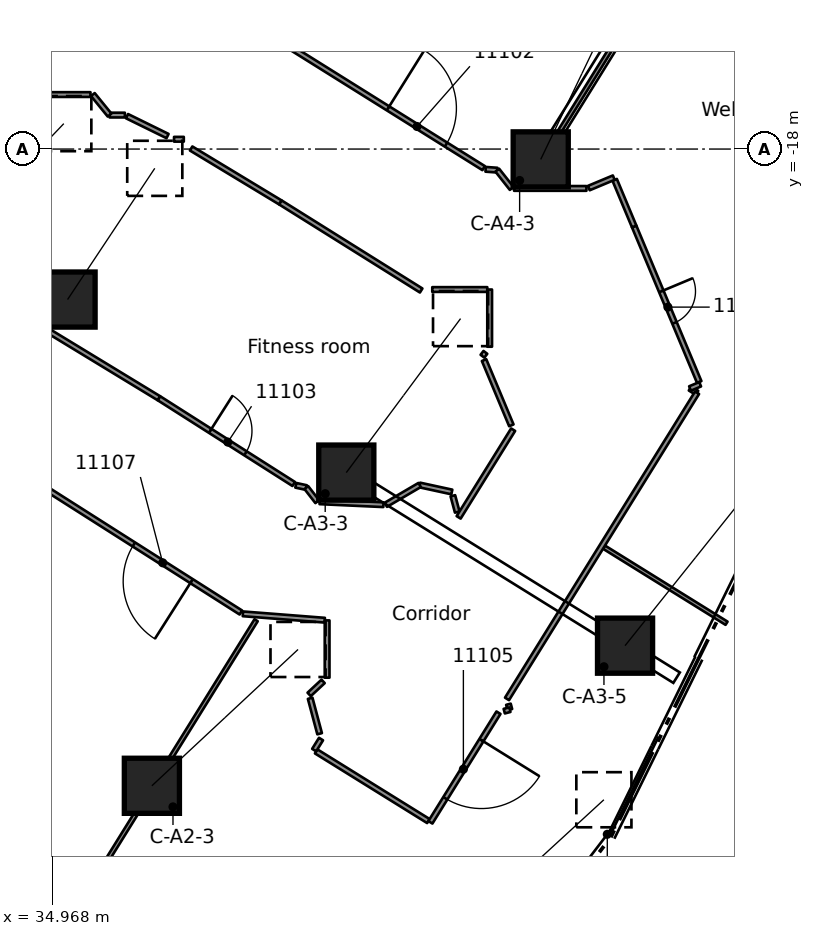
"""IFC4 building model, lengths in metres.
Left out: names, types, materials, properties, quantities, classifications, styles, units other than length and angle.
Written with IfcOpenShell. Run it as: python <this file> out.ifc"""

import sys

from ifc_helpers import new_model, si_unit, direction, frame, frame_2d, origin, origin_2d, place, context, subcontext, project, spatial, rectangle, extrude, element, fill, save


model = new_model("IFC4")
c1 = context("Model", 3, precision=1e-05, world=origin(), true_north=direction((0.0, 1.0)))
c2 = subcontext(c1, "Body", "Model", "MODEL_VIEW")
j1 = project(units=[si_unit("LENGTHUNIT", "METRE"), si_unit("PLANEANGLEUNIT", "RADIAN")], contexts=[c1])
p1 = place(None, origin())
s1 = spatial("IfcSite", under=j1, at=p1, CompositionType="ELEMENT")
p2 = place(p1, origin())
s2 = spatial("IfcBuilding", under=s1, at=p2, CompositionType="ELEMENT")
p3 = place(p2, frame((0.0, 0.0, 54.8)))
s3 = spatial("IfcBuildingStorey", under=s2, at=p3, CompositionType="ELEMENT", Elevation=54.8)
p4 = place(p3, frame((37.59, -34.754, 0.644), z_axis=(0.650011603321, 0.606231859074, 0.45822248809), x_axis=(-0.682050250906, 0.731305309183, 0.0)))
e1 = element("IfcColumn", 1, at=p4, inside=s3, PredefinedType="COLUMN", context=c2, shape_type="SweptSolid", body=[
    extrude(rectangle(XDim=1.45, YDim=1.45, at=origin_2d()), origin(), (0.0, 0.0, 1.0), 5.917),
])
p5 = place(p3, frame((44.924, -39.308, 0.666), z_axis=(0.676410943669, 0.621108726451, 0.395843637324), x_axis=(-0.676354787689, 0.736575998231, 0.0)))
e2 = element("IfcColumn", 2, at=p5, inside=s3, PredefinedType="COLUMN", context=c2, shape_type="SweptSolid", body=[
    extrude(rectangle(XDim=1.45, YDim=1.45, at=origin_2d()), origin(), (0.0, 0.0, 1.0), 6.741),
])
p6 = place(p3, frame((35.371, -21.96, 0.601), z_axis=(0.458815633404, 0.690322287577, 0.559413401536), x_axis=(-0.832828584318, 0.553530983002, 0.0)))
e3 = element("IfcColumn", 3, at=p6, inside=s3, PredefinedType="COLUMN", context=c2, shape_type="SweptSolid", body=[
    extrude(rectangle(XDim=1.45, YDim=1.45, at=origin_2d()), origin(), (0.0, 0.0, 1.0), 5.002),
])
p7 = place(p3, frame((42.706, -26.513, 0.638), z_axis=(0.52437230605, 0.706642348451, 0.475068706635), x_axis=(-0.803049477983, 0.595912355898, 0.0)))
e4 = element("IfcColumn", 4, at=p7, inside=s3, PredefinedType="COLUMN", context=c2, shape_type="SweptSolid", body=[
    extrude(rectangle(XDim=1.45, YDim=1.45, at=origin_2d()), origin(), (0.0, 0.0, 1.0), 5.734),
])
p8 = place(p3, frame((50.041, -31.067, 0.661), z_axis=(0.569633877133, 0.712332079471, 0.410000310463), x_axis=(-0.780992758951, 0.624540079151, 0.0)))
e5 = element("IfcColumn", 5, at=p8, inside=s3, PredefinedType="COLUMN", context=c2, shape_type="SweptSolid", body=[
    extrude(rectangle(XDim=1.45, YDim=1.45, at=origin_2d()), origin(), (0.0, 0.0, 1.0), 6.531),
])
p9 = place(p3, frame((32.539, -20.201, 0.591), z_axis=(0.561988017013, 0.590152683579, 0.579559555869), x_axis=(-0.724176021498, 0.689615175215, 0.0)))
e6 = element("IfcColumn", 6, at=p9, inside=s3, PredefinedType="COLUMN", context=c2, shape_type="SweptSolid", body=[
    extrude(rectangle(XDim=1.45, YDim=1.45, at=origin_2d()), origin(), (0.0, 0.0, 1.0), 4.863),
])
p10 = place(p3, frame((47.822, -18.272, 0.637), z_axis=(0.380217041429, 0.791847782589, 0.47792477506), x_axis=(-0.901465266599, 0.432851444626, 0.0)))
e7 = element("IfcColumn", 7, at=p10, inside=s3, PredefinedType="COLUMN", context=c2, shape_type="SweptSolid", body=[
    extrude(rectangle(XDim=1.45, YDim=1.45, at=origin_2d()), origin(), (0.0, 0.0, 1.0), 5.705),
])
p11 = place(p3, frame((41.755, -32.451, 0.0), z_axis=(0.0, 0.0, 1.0), x_axis=(0.257851455591, -0.966184571834, 0.0)))
e8 = element("IfcWall", 8, at=p11, inside=s3, PredefinedType="PARTITIONING", context=c2, shape_type="SweptSolid", body=[
    extrude(rectangle(XDim=0.966, YDim=0.125, at=frame_2d((0.483, 0.0))), origin(), (0.0, 0.0, 1.0), 3.58),
])
p12 = place(p3, frame((45.51, -27.123, 0.0), z_axis=(0.0, 0.0, 1.0), x_axis=(0.259479518398, -0.96574861094, 0.0)))
e9 = element("IfcWall", 9, at=p12, inside=s3, PredefinedType="PARTITIONING", context=c2, shape_type="SweptSolid", body=[
    extrude(rectangle(XDim=0.443, YDim=0.125, at=frame_2d((0.222, 0.0))), origin(), (0.0, 0.0, 1.0), 3.58),
])
p13 = place(p3, frame((46.972, -32.608, 0.0), z_axis=(0.0, 0.0, 1.0), x_axis=(0.258901994846, -0.965903596155, 0.0)))
e10 = element("IfcWall", 10, at=p13, inside=s3, PredefinedType="PARTITIONING", context=c2, shape_type="SweptSolid", body=[
    extrude(rectangle(XDim=0.147, YDim=0.125, at=frame_2d((0.074, 0.0))), origin(), (0.0, 0.0, 1.0), 3.58),
])
p14 = place(p3, frame((46.331, -23.553, 0.0), z_axis=(0.0, 0.0, 1.0), x_axis=(0.385798010162, -0.922583272857, 0.0)))
e11 = element("IfcWall", 11, at=p14, inside=s3, PredefinedType="PARTITIONING", context=c2, shape_type="SweptSolid", body=[
    extrude(rectangle(XDim=1.861, YDim=0.125, at=frame_2d((0.931, 0.0))), origin(), (0.0, 0.0, 1.0), 3.58),
])
p15 = place(p3, frame((50.281, -20.037, 0.0), z_axis=(0.0, 0.0, 1.0), x_axis=(0.385881073625, -0.922548533692, 0.0)))
e12 = element("IfcWall", 12, at=p15, inside=s3, PredefinedType="PARTITIONING", context=c2, shape_type="SweptSolid", body=[
    extrude(rectangle(XDim=4.436, YDim=0.125, at=frame_2d((2.218, 0.0))), origin(), (0.0, 0.0, 1.0), 3.58),
])
p16 = place(p15, frame((1.85, 0.0, 0.0)))
e13 = element("IfcOpeningElement", 13, at=p16, cuts=e12, PredefinedType="OPENING", context=c2, shape_type="SweptSolid", body=[
    extrude(rectangle(XDim=0.9, YDim=2.1, at=frame_2d((0.45, 1.05))), frame((0.0, 0.073, 0.0), z_axis=(0.0, -1.0, 0.0), x_axis=(1.0, 0.0, 0.0)), (0.0, 0.0, 1.0), 0.145),
])
p17 = place(p3, frame((49.768, -18.81, 0.0), z_axis=(0.0, 0.0, 1.0), x_axis=(0.385683969808, -0.922630953, 0.0)))
e14 = element("IfcWall", 14, at=p17, inside=s3, PredefinedType="PARTITIONING", context=c2, shape_type="SweptSolid", body=[
    extrude(rectangle(XDim=1.33, YDim=0.125, at=frame_2d((0.665, 0.0))), origin(), (0.0, 0.0, 1.0), 3.58),
])
p18 = place(p3, frame((39.932, -30.195, 0.0), z_axis=(0.0, 0.0, 1.0), x_axis=(-0.843820070804, 0.536626208927, 0.0)))
e15 = element("IfcWall", 15, at=p18, inside=s3, PredefinedType="PARTITIONING", context=c2, shape_type="SweptSolid", body=[
    extrude(rectangle(XDim=6.464, YDim=0.125, at=frame_2d((3.232, 0.0))), origin(), (0.0, 0.0, 1.0), 3.58),
])
p19 = place(p18, frame((1.538, 0.0, 0.0)))
e16 = element("IfcOpeningElement", 16, at=p19, cuts=e15, PredefinedType="OPENING", context=c2, shape_type="SweptSolid", body=[
    extrude(rectangle(XDim=1.8, YDim=2.1, at=frame_2d((0.9, 1.05))), frame((0.0, 0.073, 0.0), z_axis=(0.0, -1.0, 0.0), x_axis=(1.0, 0.0, 0.0)), (0.0, 0.0, 1.0), 0.145),
])
p20 = place(p3, frame((37.774, -24.556, 0.0), z_axis=(0.0, 0.0, 1.0), x_axis=(0.843747538383, -0.53674024581, 0.0)))
e17 = element("IfcWall", 17, at=p20, inside=s3, PredefinedType="PARTITIONING", context=c2, shape_type="SweptSolid", body=[
    extrude(rectangle(XDim=4.205, YDim=0.125, at=frame_2d((2.103, 0.0))), origin(), (0.0, 0.0, 1.0), 3.58),
])
p21 = place(p20, frame((1.6, 0.0, 0.0)))
e18 = element("IfcOpeningElement", 18, at=p21, cuts=e17, PredefinedType="OPENING", context=c2, shape_type="SweptSolid", body=[
    extrude(rectangle(XDim=1.1, YDim=2.1, at=frame_2d((0.55, 1.05))), frame((0.0, 0.073, 0.0), z_axis=(0.0, -1.0, 0.0), x_axis=(1.0, 0.0, 0.0)), (0.0, 0.0, 1.0), 0.145),
])
p22 = place(p3, frame((37.774, -24.556, 0.0), z_axis=(0.0, 0.0, 1.0), x_axis=(-0.854394223193, 0.519625356747, 0.0)))
e19 = element("IfcWall", 19, at=p22, inside=s3, PredefinedType="PARTITIONING", context=c2, shape_type="SweptSolid", body=[
    extrude(rectangle(XDim=3.444, YDim=0.125, at=frame_2d((1.722, 0.0))), origin(), (0.0, 0.0, 1.0), 3.58),
])
p23 = place(p3, frame((40.972, -19.405, 0.0), z_axis=(0.0, 0.0, 1.0), x_axis=(-0.8557851023, 0.517331478534, 0.0)))
e20 = element("IfcWall", 20, at=p23, inside=s3, PredefinedType="PARTITIONING", context=c2, shape_type="SweptSolid", body=[
    extrude(rectangle(XDim=2.745, YDim=0.125, at=frame_2d((1.372, 0.0))), origin(), (0.0, 0.0, 1.0), 3.58),
])
p24 = place(p3, frame((40.972, -19.405, 0.0), z_axis=(0.0, 0.0, 1.0), x_axis=(0.847809891227, -0.530300281291, 0.0)))
e21 = element("IfcWall", 21, at=p24, inside=s3, PredefinedType="PARTITIONING", context=c2, shape_type="SweptSolid", body=[
    extrude(rectangle(XDim=4.369, YDim=0.125, at=frame_2d((2.185, 0.0))), origin(), (0.0, 0.0, 1.0), 3.58),
])
p25 = place(p3, frame((40.567, -14.906, 0.0), z_axis=(0.0, 0.0, 1.0), x_axis=(0.847984152338, -0.530021581998, 0.0)))
e22 = element("IfcWall", 22, at=p25, inside=s3, PredefinedType="PARTITIONING", context=c2, shape_type="SweptSolid", body=[
    extrude(rectangle(XDim=6.784, YDim=0.125, at=frame_2d((3.392, 0.0))), origin(), (0.0, 0.0, 1.0), 3.58),
])
p26 = place(p25, frame((3.817, 0.0, 0.0)))
e23 = element("IfcOpeningElement", 23, at=p26, cuts=e22, PredefinedType="OPENING", context=c2, shape_type="SweptSolid", body=[
    extrude(rectangle(XDim=1.8, YDim=2.1, at=frame_2d((0.9, 1.05))), frame((0.0, 0.073, 0.0), z_axis=(0.0, -1.0, 0.0), x_axis=(1.0, 0.0, 0.0)), (0.0, 0.0, 1.0), 0.145),
])
p27 = place(p3, frame((51.751, -24.3, 0.0), z_axis=(0.0, 0.0, 1.0), x_axis=(0.84888732671, -0.528573842098, 0.0)))
e24 = element("IfcWall", 24, at=p27, inside=s3, PredefinedType="PARTITIONING", context=c2, shape_type="SweptSolid", body=[
    extrude(rectangle(XDim=0.216, YDim=0.125, at=frame_2d((0.108, 0.0))), origin(), (0.0, 0.0, 1.0), 3.58),
])
p28 = place(p3, frame((41.913, -33.849, 0.0), z_axis=(0.0, 0.0, 1.0), x_axis=(0.849647763732, -0.527350621111, 0.0)))
e25 = element("IfcWall", 25, at=p28, inside=s3, PredefinedType="PARTITIONING", context=c2, shape_type="SweptSolid", body=[
    extrude(rectangle(XDim=3.475, YDim=0.125, at=frame_2d((1.738, 0.0))), origin(), (0.0, 0.0, 1.0), 3.58),
])
p29 = place(p3, frame((49.487, -28.475, 0.0), z_axis=(0.0, 0.0, 1.0), x_axis=(0.849602400196, -0.527423702143, 0.0)))
e26 = element("IfcWall", 26, at=p29, inside=s3, PredefinedType="PARTITIONING", context=c2, shape_type="SweptSolid", body=[
    extrude(rectangle(XDim=3.796, YDim=0.1, at=frame_2d((1.898, 0.0))), origin(), (0.0, 0.0, 1.0), 3.58),
])
p30 = place(p3, frame((36.935, -17.134, 0.0), z_axis=(0.0, 0.0, 1.0), x_axis=(0.897608509631, -0.440793561022, 0.0)))
e27 = element("IfcWall", 27, at=p30, inside=s3, PredefinedType="PARTITIONING", context=c2, shape_type="SweptSolid", body=[
    extrude(rectangle(XDim=1.188, YDim=0.125, at=frame_2d((0.594, 0.0))), origin(), (0.0, 0.0, 1.0), 3.58),
])
p31 = place(p3, frame((39.985, -30.229, 0.0), z_axis=(0.0, 0.0, 1.0), x_axis=(0.996972826888, -0.077750771356, 0.0)))
e28 = element("IfcWall", 28, at=p31, inside=s3, PredefinedType="PARTITIONING", context=c2, shape_type="SweptSolid", body=[
    extrude(rectangle(XDim=2.16, YDim=0.125, at=frame_2d((1.08, 0.0))), origin(), (0.0, 0.0, 1.0), 3.58),
])
p32 = place(p3, frame((44.636, -26.839, 0.0), z_axis=(0.0, 0.0, 1.0), x_axis=(0.977242421198, -0.212125552944, 0.0)))
e29 = element("IfcWall", 29, at=p32, inside=s3, PredefinedType="PARTITIONING", context=c2, shape_type="SweptSolid", body=[
    extrude(rectangle(XDim=0.867, YDim=0.125, at=frame_2d((0.433, 0.0))), origin(), (0.0, 0.0, 1.0), 3.58),
])
p33 = place(p3, frame((43.683, -27.358, 0.0), z_axis=(0.0, 0.0, 1.0), x_axis=(-0.998952909466, 0.045750242292, 0.0)))
e30 = element("IfcWall", 30, at=p33, inside=s3, PredefinedType="PARTITIONING", context=c2, shape_type="SweptSolid", body=[
    extrude(rectangle(XDim=1.681, YDim=0.125, at=frame_2d((0.84, 0.0))), origin(), (0.0, 0.0, 1.0), 3.58),
])
p34 = place(p3, frame((41.377, -26.847, 0.0), z_axis=(0.0, 0.0, 1.0), x_axis=(0.977308287744, -0.211821884392, 0.0)))
e31 = element("IfcWall", 31, at=p34, inside=s3, PredefinedType="PARTITIONING", context=c2, shape_type="SweptSolid", body=[
    extrude(rectangle(XDim=0.283, YDim=0.125, at=frame_2d((0.142, 0.0))), origin(), (0.0, 0.0, 1.0), 3.58),
])
p35 = place(p3, frame((46.372, -18.533, 0.0), z_axis=(0.0, 0.0, 1.0), x_axis=(0.99743033576, -0.071643040877, 0.0)))
e32 = element("IfcWall", 32, at=p35, inside=s3, PredefinedType="PARTITIONING", context=c2, shape_type="SweptSolid", body=[
    extrude(rectangle(XDim=0.307, YDim=0.125, at=frame_2d((0.153, 0.0))), origin(), (0.0, 0.0, 1.0), 3.58),
])
p36 = place(p3, frame((44.968, -21.696, 0.0), z_axis=(0.0, 0.0, 1.0), x_axis=(1.0, 0.0, 0.0)))
e33 = element("IfcWall", 33, at=p36, inside=s3, PredefinedType="PARTITIONING", context=c2, shape_type="SweptSolid", body=[
    extrude(rectangle(XDim=1.448, YDim=0.125, at=frame_2d((0.724, 0.0))), origin(), (0.0, 0.0, 1.0), 3.58),
])
p37 = place(p3, frame((47.12, -19.036, 0.0), z_axis=(0.0, 0.0, 1.0), x_axis=(1.0, 0.0, 0.0)))
e34 = element("IfcWall", 34, at=p37, inside=s3, PredefinedType="PARTITIONING", context=c2, shape_type="SweptSolid", body=[
    extrude(rectangle(XDim=1.905, YDim=0.125, at=frame_2d((0.952, 0.0))), origin(), (0.0, 0.0, 1.0), 3.58),
])
p38 = place(p3, frame((38.173, -17.742, 0.0), z_axis=(0.0, 0.0, 1.0), x_axis=(1.0, 0.0, 0.0)))
e35 = element("IfcWall", 35, at=p38, inside=s3, PredefinedType="PARTITIONING", context=c2, shape_type="SweptSolid", body=[
    extrude(rectangle(XDim=0.257, YDim=0.125, at=frame_2d((0.128, 0.0))), origin(), (0.0, 0.0, 1.0), 3.58),
])
p39 = place(p3, frame((36.477, -17.106, 0.0), z_axis=(0.0, 0.0, 1.0), x_axis=(1.0, 0.0, 0.0)))
e36 = element("IfcWall", 36, at=p39, inside=s3, PredefinedType="PARTITIONING", context=c2, shape_type="SweptSolid", body=[
    extrude(rectangle(XDim=0.402, YDim=0.125, at=frame_2d((0.201, 0.0))), origin(), (0.0, 0.0, 1.0), 3.58),
])
p40 = place(p3, frame((34.674, -16.566, 0.0), z_axis=(0.0, 0.0, 1.0), x_axis=(1.0, 0.0, 0.0)))
e37 = element("IfcWall", 37, at=p40, inside=s3, PredefinedType="PARTITIONING", context=c2, shape_type="SweptSolid", body=[
    extrude(rectangle(XDim=1.3, YDim=0.125, at=frame_2d((0.65, 0.0))), origin(), (0.0, 0.0, 1.0), 3.58),
])
p41 = place(p3, frame((46.862, -32.79, 0.0), z_axis=(0.0, 0.0, 1.0), x_axis=(0.96686754856, 0.255278560676, 0.0)))
e38 = element("IfcWall", 38, at=p41, inside=s3, PredefinedType="PARTITIONING", context=c2, shape_type="SweptSolid", body=[
    extrude(rectangle(XDim=0.153, YDim=0.125, at=frame_2d((0.077, 0.0))), origin(), (0.0, 0.0, 1.0), 3.58),
])
p42 = place(p3, frame((51.751, -24.3, 0.0), z_axis=(0.0, 0.0, 1.0), x_axis=(0.922826245199, 0.385216460152, 0.0)))
e39 = element("IfcWall", 39, at=p42, inside=s3, PredefinedType="PARTITIONING", context=c2, shape_type="SweptSolid", body=[
    extrude(rectangle(XDim=0.288, YDim=0.125, at=frame_2d((0.144, 0.0))), origin(), (0.0, 0.0, 1.0), 3.58),
])
p43 = place(p3, frame((49.087, -19.027, 0.0), z_axis=(0.0, 0.0, 1.0), x_axis=(0.922375671866, 0.386294084798, 0.0)))
e40 = element("IfcWall", 40, at=p43, inside=s3, PredefinedType="PARTITIONING", context=c2, shape_type="SweptSolid", body=[
    extrude(rectangle(XDim=0.712, YDim=0.125, at=frame_2d((0.356, 0.0))), origin(), (0.0, 0.0, 1.0), 3.58),
])
p44 = place(p3, frame((41.728, -32.35, 0.0), z_axis=(0.0, 0.0, 1.0), x_axis=(0.731426379857, 0.681920413868, 0.0)))
e41 = element("IfcWall", 41, at=p44, inside=s3, PredefinedType="PARTITIONING", context=c2, shape_type="SweptSolid", body=[
    extrude(rectangle(XDim=0.503, YDim=0.125, at=frame_2d((0.251, 0.0))), origin(), (0.0, 0.0, 1.0), 3.58),
])
p45 = place(p3, frame((46.289, -23.451, 0.0), z_axis=(0.0, 0.0, 1.0), x_axis=(0.606449175924, 0.795122252878, 0.0)))
e42 = element("IfcWall", 42, at=p45, inside=s3, PredefinedType="PARTITIONING", context=c2, shape_type="SweptSolid", body=[
    extrude(rectangle(XDim=0.127, YDim=0.125, at=frame_2d((0.063, 0.0))), origin(), (0.0, 0.0, 1.0), 3.58),
])
p46 = place(p3, frame((41.86, -33.815, 0.0), z_axis=(0.0, 0.0, 1.0), x_axis=(0.527948010294, 0.849276691324, 0.0)))
e43 = element("IfcWall", 43, at=p46, inside=s3, PredefinedType="PARTITIONING", context=c2, shape_type="SweptSolid", body=[
    extrude(rectangle(XDim=0.343, YDim=0.125, at=frame_2d((0.171, 0.0))), origin(), (0.0, 0.0, 1.0), 3.58),
])
p47 = place(p3, frame((45.662, -27.691, 0.0), z_axis=(0.0, 0.0, 1.0), x_axis=(0.527888562737, 0.849313643674, 0.0)))
e44 = element("IfcWall", 44, at=p47, inside=s3, PredefinedType="PARTITIONING", context=c2, shape_type="SweptSolid", body=[
    extrude(rectangle(XDim=2.716, YDim=0.125, at=frame_2d((1.358, 0.0))), origin(), (0.0, 0.0, 1.0), 3.58),
])
p48 = place(p3, frame((46.71, -32.831, 0.0), z_axis=(0.0, 0.0, 1.0), x_axis=(-0.527559761844, -0.849517920755, 0.0)))
e45 = element("IfcWall", 45, at=p48, inside=s3, PredefinedType="PARTITIONING", context=c2, shape_type="SweptSolid", body=[
    extrude(rectangle(XDim=3.395, YDim=0.125, at=frame_2d((1.698, 0.0))), origin(), (0.0, 0.0, 1.0), 3.58),
])
p49 = place(p48, frame((0.85, 0.0, 0.0)))
e46 = element("IfcOpeningElement", 46, at=p49, cuts=e45, PredefinedType="OPENING", context=c2, shape_type="SweptSolid", body=[
    extrude(rectangle(XDim=1.8, YDim=2.1, at=frame_2d((0.9, 1.05))), frame((0.0, 0.073, 0.0), z_axis=(0.0, -1.0, 0.0), x_axis=(1.0, 0.0, 0.0)), (0.0, 0.0, 1.0), 0.145),
])
p50 = place(p3, frame((46.935, -32.468, 0.0), z_axis=(0.0, 0.0, 1.0), x_axis=(0.527420544761, 0.849604360255, 0.0)))
e47 = element("IfcWall", 47, at=p50, inside=s3, PredefinedType="PARTITIONING", context=c2, shape_type="SweptSolid", body=[
    extrude(rectangle(XDim=9.482, YDim=0.125, at=frame_2d((4.741, 0.0))), origin(), (0.0, 0.0, 1.0), 3.58),
])
p51 = place(p3, frame((32.082, -43.688, 0.0), z_axis=(0.0, 0.0, 1.0), x_axis=(0.527454544874, 0.849583252596, 0.0)))
e48 = element("IfcWall", 48, at=p51, inside=s3, PredefinedType="PARTITIONING", context=c2, shape_type="SweptSolid", body=[
    extrude(rectangle(XDim=15.643, YDim=0.1, at=frame_2d((7.822, 0.0))), origin(), (0.0, 0.0, 1.0), 3.58),
])
p52 = place(p3, frame((47.442, -18.947, 0.0), z_axis=(0.0, 0.0, 1.0), x_axis=(0.527488067466, 0.849562439542, 0.0)))
e49 = element("IfcWall", 49, at=p52, inside=s3, PredefinedType="PARTITIONING", context=c2, shape_type="SweptSolid", body=[
    extrude(rectangle(XDim=16.114, YDim=0.1, at=frame_2d((8.057, 0.0))), origin(), (0.0, 0.0, 1.0), 3.58),
])
p53 = place(p3, frame((26.368, -15.719, 0.0), z_axis=(0.0, 0.0, 1.0), x_axis=(0.527457310134, 0.849581535808, 0.0)))
e50 = element("IfcWall", 50, at=p53, inside=s3, PredefinedType="PARTITIONING", context=c2, shape_type="SweptSolid", body=[
    extrude(rectangle(XDim=22.842, YDim=0.1, at=frame_2d((11.421, 0.0))), origin(), (0.0, 0.0, 1.0), 3.58),
])
p54 = place(p3, frame((43.745, -27.361, 0.0), z_axis=(0.0, 0.0, 1.0), x_axis=(0.86280822345, 0.505531373455, 0.0)))
e51 = element("IfcWall", 51, at=p54, inside=s3, PredefinedType="PARTITIONING", context=c2, shape_type="SweptSolid", body=[
    extrude(rectangle(XDim=1.032, YDim=0.125, at=frame_2d((0.516, 0.0))), origin(), (0.0, 0.0, 1.0), 3.58),
])
p55 = place(p3, frame((47.058, -19.036, 0.0), z_axis=(0.0, 0.0, 1.0), x_axis=(-0.620070307774, 0.784546246831, 0.0)))
e52 = element("IfcWall", 52, at=p55, inside=s3, PredefinedType="PARTITIONING", context=c2, shape_type="SweptSolid", body=[
    extrude(rectangle(XDim=0.613, YDim=0.125, at=frame_2d((0.307, 0.0))), origin(), (0.0, 0.0, 1.0), 3.58),
])
p56 = place(p3, frame((46.478, -23.201, 0.0), z_axis=(0.0, 0.0, 1.0), x_axis=(0.0, 1.0, 0.0)))
e53 = element("IfcWall", 53, at=p56, inside=s3, PredefinedType="PARTITIONING", context=c2, shape_type="SweptSolid", body=[
    extrude(rectangle(XDim=1.505, YDim=0.125, at=frame_2d((0.752, 0.0))), origin(), (0.0, 0.0, 1.0), 3.58),
])
p57 = place(p3, frame((42.201, -31.909, 0.0), z_axis=(0.0, 0.0, 1.0), x_axis=(0.0, 1.0, 0.0)))
e54 = element("IfcWall", 54, at=p57, inside=s3, PredefinedType="PARTITIONING", context=c2, shape_type="SweptSolid", body=[
    extrude(rectangle(XDim=1.507, YDim=0.125, at=frame_2d((0.753, 0.0))), origin(), (0.0, 0.0, 1.0), 3.58),
])
p58 = place(p3, frame((41.942, -27.278, 0.0), z_axis=(0.0, 0.0, 1.0), x_axis=(-0.612896389525, 0.790163284206, 0.0)))
e55 = element("IfcWall", 55, at=p58, inside=s3, PredefinedType="PARTITIONING", context=c2, shape_type="SweptSolid", body=[
    extrude(rectangle(XDim=0.47, YDim=0.125, at=frame_2d((0.235, 0.0))), origin(), (0.0, 0.0, 1.0), 3.58),
])
p59 = place(p3, frame((36.477, -17.106, 0.0), z_axis=(0.0, 0.0, 1.0), x_axis=(-0.631594931401, 0.775298550643, 0.0)))
e56 = element("IfcWall", 56, at=p59, inside=s3, PredefinedType="PARTITIONING", context=c2, shape_type="SweptSolid", body=[
    extrude(rectangle(XDim=0.697, YDim=0.125, at=frame_2d((0.348, 0.0))), origin(), (0.0, 0.0, 1.0), 3.58),
])
p60 = place(p26, origin())
e57 = element("IfcDoor", 57, at=p60, inside=s3, OperationType="DOUBLE_DOOR_SINGLE_SWING", PredefinedType="DOOR", context=c2, shape_type="SweptSolid", body=[
    extrude(rectangle(XDim=1.8, YDim=2.1, at=frame_2d((0.9, 1.05))), frame((0.0, 0.025, 0.0), z_axis=(0.0, -1.0, 0.0), x_axis=(1.0, 0.0, 0.0)), (0.0, 0.0, 1.0), 0.05),
])
fill(e23, e57)
p61 = place(p21, origin())
e58 = element("IfcDoor", 58, at=p61, inside=s3, OperationType="SINGLE_SWING_RIGHT", PredefinedType="DOOR", context=c2, shape_type="SweptSolid", body=[
    extrude(rectangle(XDim=1.1, YDim=2.1, at=frame_2d((0.55, 1.05))), frame((0.0, 0.025, 0.0), z_axis=(0.0, -1.0, 0.0), x_axis=(1.0, 0.0, 0.0)), (0.0, 0.0, 1.0), 0.05),
])
fill(e18, e58)
p62 = place(p16, origin())
e59 = element("IfcDoor", 59, at=p62, inside=s3, OperationType="SINGLE_SWING_RIGHT", PredefinedType="DOOR", context=c2, shape_type="SweptSolid", body=[
    extrude(rectangle(XDim=0.9, YDim=2.1, at=frame_2d((0.45, 1.05))), frame((0.0, 0.025, 0.0), z_axis=(0.0, -1.0, 0.0), x_axis=(1.0, 0.0, 0.0)), (0.0, 0.0, 1.0), 0.05),
])
fill(e13, e59)
p63 = place(p49, origin())
e60 = element("IfcDoor", 60, at=p63, inside=s3, OperationType="DOUBLE_DOOR_SINGLE_SWING", PredefinedType="DOOR", context=c2, shape_type="SweptSolid", body=[
    extrude(rectangle(XDim=1.8, YDim=2.1, at=frame_2d((0.9, 1.05))), frame((0.0, 0.025, 0.0), z_axis=(0.0, -1.0, 0.0), x_axis=(1.0, 0.0, 0.0)), (0.0, 0.0, 1.0), 0.05),
])
fill(e46, e60)
p64 = place(p19, origin())
e61 = element("IfcDoor", 61, at=p64, inside=s3, OperationType="DOUBLE_DOOR_SINGLE_SWING", PredefinedType="DOOR", context=c2, shape_type="SweptSolid", body=[
    extrude(rectangle(XDim=1.8, YDim=2.1, at=frame_2d((0.9, 1.05))), frame((0.0, 0.025, 0.0), z_axis=(0.0, -1.0, 0.0), x_axis=(1.0, 0.0, 0.0)), (0.0, 0.0, 1.0), 0.05),
])
fill(e16, e61)
save(model, sys.argv[1])
